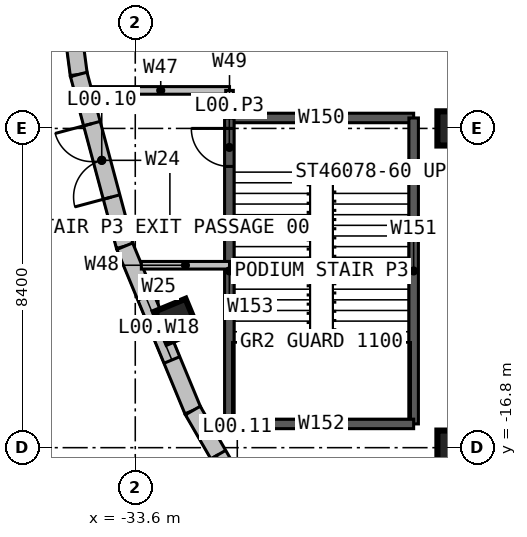
"""IFC4 building model, lengths in metres.
Left out: names, types, materials, properties, quantities, classifications, styles, units other than length and angle.
Written with IfcOpenShell. Run it as: python <this file> out.ifc"""

import sys

from ifc_helpers import new_model, si_unit, direction, frame, frame_2d, origin, origin_2d, place, context, subcontext, project, spatial, rectangle, extrude, element, fill, save


model = new_model("IFC4")
c1 = context("Model", 3, precision=1e-05, world=origin(), true_north=direction((0.0, 1.0)))
c2 = subcontext(c1, "Body", "Model", "MODEL_VIEW")
j1 = project(units=[si_unit("LENGTHUNIT", "METRE"), si_unit("PLANEANGLEUNIT", "RADIAN")], contexts=[c1])
p1 = place(None, origin())
s1 = spatial("IfcSite", under=j1, at=p1, CompositionType="ELEMENT")
p2 = place(p1, origin())
s2 = spatial("IfcBuilding", under=s1, at=p2, CompositionType="ELEMENT")
p3 = place(p2, origin())
s3 = spatial("IfcBuildingStorey", under=s2, at=p3, CompositionType="ELEMENT", Elevation=0.0)
for number, where, z_axis, x_axis in (
    (1, (-25.2, -16.8, 0.0), (0.0, 0.0, 1.0), (1.0, 0.0, 0.0)),
    (2, (-25.2, -8.4, 0.0), (0.0, 0.0, 1.0), (1.0, 0.0, 0.0)),
    (3, (-32.521, -13.47, 0.0), (0.0, 0.0, 1.0), (-0.924, -0.383, 0.0)),
):
    element("IfcColumn", number, at=place(p3, frame(where, z_axis=z_axis, x_axis=x_axis)), inside=s3, PredefinedType="COLUMN", context=c2, shape_type="SweptSolid", body=[
        extrude(rectangle(XDim=0.9, YDim=0.9, at=origin_2d()), origin(), (0.0, 0.0, 1.0), 6.0),
    ])
p4 = place(p3, frame((-35.698, -2.34, 0.0), z_axis=(0.0, 0.0, 1.0), x_axis=(0.130536838198, -0.991443459746, 0.0)))
e4 = element("IfcWall", 4, at=p4, inside=s3, PredefinedType="SOLIDWALL", context=c2, shape_type="SweptSolid", body=[
    extrude(rectangle(XDim=4.679, YDim=0.45, at=frame_2d((2.34, 0.0))), origin(), (0.0, 0.0, 1.0), 5.7),
])
p5 = place(p4, frame((1.44, 0.0, 0.9)))
e5 = element("IfcOpeningElement", 5, at=p5, cuts=e4, PredefinedType="OPENING", context=c2, shape_type="SweptSolid", body=[
    extrude(rectangle(XDim=1.8, YDim=3.6, at=frame_2d((0.9, 1.8))), frame((0.0, 0.235, 0.0), z_axis=(0.0, -1.0, 0.0), x_axis=(1.0, 0.0, 0.0)), (0.0, 0.0, 1.0), 0.47),
])
p6 = place(p3, frame((-35.088, -6.979, 0.0), z_axis=(0.0, 0.0, 1.0), x_axis=(0.258815185258, -0.965926860523, 0.0)))
e6 = element("IfcWall", 6, at=p6, inside=s3, PredefinedType="SOLIDWALL", context=c2, shape_type="SweptSolid", body=[
    extrude(rectangle(XDim=4.68, YDim=0.45, at=frame_2d((2.34, 0.0))), origin(), (0.0, 0.0, 1.0), 5.7),
])
p7 = place(p6, frame((1.34, 0.0, 0.0)))
e7 = element("IfcOpeningElement", 7, at=p7, cuts=e6, PredefinedType="OPENING", context=c2, shape_type="SweptSolid", body=[
    extrude(rectangle(XDim=2.0, YDim=3.0, at=frame_2d((1.0, 1.5))), frame((0.0, 0.235, 0.0), z_axis=(0.0, -1.0, 0.0), x_axis=(1.0, 0.0, 0.0)), (0.0, 0.0, 1.0), 0.47),
])
p8 = place(p3, frame((-33.876, -11.5, 0.0), z_axis=(0.0, 0.0, 1.0), x_axis=(0.382669718086, -0.923885213032, 0.0)))
e8 = element("IfcWall", 8, at=p8, inside=s3, PredefinedType="SOLIDWALL", context=c2, shape_type="SweptSolid", body=[
    extrude(rectangle(XDim=4.68, YDim=0.45, at=frame_2d((2.34, 0.0))), origin(), (0.0, 0.0, 1.0), 5.7),
])
p9 = place(p8, frame((1.44, 0.0, 0.9)))
e9 = element("IfcOpeningElement", 9, at=p9, cuts=e8, PredefinedType="OPENING", context=c2, shape_type="SweptSolid", body=[
    extrude(rectangle(XDim=1.8, YDim=3.6, at=frame_2d((0.9, 1.8))), frame((0.0, 0.235, 0.0), z_axis=(0.0, -1.0, 0.0), x_axis=(1.0, 0.0, 0.0)), (0.0, 0.0, 1.0), 0.47),
])
p10 = place(p3, frame((-32.086, -15.823, 0.0), z_axis=(0.0, 0.0, 1.0), x_axis=(0.500022025083, -0.866012687223, 0.0)))
e10 = element("IfcWall", 10, at=p10, inside=s3, PredefinedType="SOLIDWALL", context=c2, shape_type="SweptSolid", body=[
    extrude(rectangle(XDim=4.679, YDim=0.45, at=frame_2d((2.34, 0.0))), origin(), (0.0, 0.0, 1.0), 5.7),
])
p11 = place(p10, frame((1.34, 0.0, 0.0)))
e11 = element("IfcOpeningElement", 11, at=p11, cuts=e10, PredefinedType="OPENING", context=c2, shape_type="SweptSolid", body=[
    extrude(rectangle(XDim=2.0, YDim=3.0, at=frame_2d((1.0, 1.5))), frame((0.0, 0.235, 0.0), z_axis=(0.0, -1.0, 0.0), x_axis=(1.0, 0.0, 0.0)), (0.0, 0.0, 1.0), 0.47),
])
p12 = place(p3, frame((-31.125, -8.125, 0.0), z_axis=(0.0, 0.0, 1.0), x_axis=(1.0, 0.0, 0.0)))
e12 = element("IfcWall", 12, at=p12, inside=s3, PredefinedType="SOLIDWALL", context=c2, shape_type="SweptSolid", body=[
    extrude(rectangle(XDim=4.85, YDim=0.25, at=frame_2d((2.425, 0.0))), origin(), (0.0, 0.0, 1.0), 6.0),
])
p13 = place(p3, frame((-26.275, -8.125, 0.0), z_axis=(0.0, 0.0, 1.0), x_axis=(0.0, -1.0, 0.0)))
e13 = element("IfcWall", 13, at=p13, inside=s3, PredefinedType="SOLIDWALL", context=c2, shape_type="SweptSolid", body=[
    extrude(rectangle(XDim=8.05, YDim=0.25, at=frame_2d((4.025, 0.0))), origin(), (0.0, 0.0, 1.0), 6.0),
])
p14 = place(p3, frame((-26.275, -16.175, 0.0), z_axis=(0.0, 0.0, 1.0), x_axis=(-1.0, 0.0, 0.0)))
e14 = element("IfcWall", 14, at=p14, inside=s3, PredefinedType="SOLIDWALL", context=c2, shape_type="SweptSolid", body=[
    extrude(rectangle(XDim=4.85, YDim=0.25, at=frame_2d((2.425, 0.0))), origin(), (0.0, 0.0, 1.0), 6.0),
])
p15 = place(p3, frame((-31.125, -16.175, 0.0), z_axis=(0.0, 0.0, 1.0), x_axis=(0.0, 1.0, 0.0)))
e15 = element("IfcWall", 15, at=p15, inside=s3, PredefinedType="SOLIDWALL", context=c2, shape_type="SweptSolid", body=[
    extrude(rectangle(XDim=8.05, YDim=0.25, at=frame_2d((4.025, 0.0))), origin(), (0.0, 0.0, 1.0), 6.0),
])
p16 = place(p15, frame((6.775, 0.0, 0.0)))
e16 = element("IfcOpeningElement", 16, at=p16, cuts=e15, PredefinedType="OPENING", context=c2, shape_type="SweptSolid", body=[
    extrude(rectangle(XDim=1.0, YDim=2.2, at=frame_2d((0.5, 1.1))), frame((0.0, 0.135, 0.0), z_axis=(0.0, -1.0, 0.0), x_axis=(1.0, 0.0, 0.0)), (0.0, 0.0, 1.0), 0.27),
])
p17 = place(p3, frame((-34.74, -7.4, 0.0), z_axis=(0.0, 0.0, 1.0), x_axis=(1.0, 0.0, 0.0)))
e17 = element("IfcWall", 17, at=p17, inside=s3, PredefinedType="PARTITIONING", context=c2, shape_type="SweptSolid", body=[
    extrude(rectangle(XDim=3.62, YDim=0.2, at=frame_2d((1.81, 0.0))), origin(), (0.0, 0.0, 1.0), 5.7),
])
p18 = place(p3, frame((-33.44, -12.0, 0.0), z_axis=(0.0, 0.0, 1.0), x_axis=(1.0, 0.0, 0.0)))
e18 = element("IfcWall", 18, at=p18, inside=s3, PredefinedType="PARTITIONING", context=c2, shape_type="SweptSolid", body=[
    extrude(rectangle(XDim=2.32, YDim=0.2, at=frame_2d((1.16, 0.0))), origin(), (0.0, 0.0, 1.0), 5.7),
])
p19 = place(p3, frame((-31.12, -8.12, 0.0), z_axis=(0.0, 0.0, 1.0), x_axis=(0.0, 1.0, 0.0)))
e19 = element("IfcWall", 19, at=p19, inside=s3, PredefinedType="PARTITIONING", context=c2, shape_type="SweptSolid", body=[
    extrude(rectangle(XDim=0.72, YDim=0.2, at=frame_2d((0.36, 0.0))), origin(), (0.0, 0.0, 1.0), 5.7),
])
p20 = place(p7, frame((2.0, 0.0, 0.0), z_axis=(0.0, 0.0, 1.0), x_axis=(-1.0, 0.0, 0.0)))
e20 = element("IfcDoor", 20, at=p20, inside=s3, OperationType="DOUBLE_DOOR_SINGLE_SWING", PredefinedType="DOOR", context=c2, shape_type="SweptSolid", body=[
    extrude(rectangle(XDim=2.0, YDim=3.0, at=frame_2d((1.0, 1.5))), frame((0.0, 0.025, 0.0), z_axis=(0.0, -1.0, 0.0), x_axis=(1.0, 0.0, 0.0)), (0.0, 0.0, 1.0), 0.05),
])
fill(e7, e20)
p21 = place(p9, origin())
e21 = element("IfcWindow", 21, at=p21, inside=s3, PartitioningType="SINGLE_PANEL", PredefinedType="WINDOW", context=c2, shape_type="SweptSolid", body=[
    extrude(rectangle(XDim=1.8, YDim=3.6, at=frame_2d((0.9, 1.8))), frame((0.0, 0.03, 0.0), z_axis=(0.0, -1.0, 0.0), x_axis=(1.0, 0.0, 0.0)), (0.0, 0.0, 1.0), 0.06),
])
fill(e9, e21)
p22 = place(p11, frame((2.0, 0.0, 0.0), z_axis=(0.0, 0.0, 1.0), x_axis=(-1.0, 0.0, 0.0)))
e22 = element("IfcDoor", 22, at=p22, inside=s3, OperationType="DOUBLE_DOOR_SINGLE_SWING", PredefinedType="DOOR", context=c2, shape_type="SweptSolid", body=[
    extrude(rectangle(XDim=2.0, YDim=3.0, at=frame_2d((1.0, 1.5))), frame((0.0, 0.025, 0.0), z_axis=(0.0, -1.0, 0.0), x_axis=(1.0, 0.0, 0.0)), (0.0, 0.0, 1.0), 0.05),
])
fill(e11, e22)
p23 = place(p16, origin())
e23 = element("IfcDoor", 23, at=p23, inside=s3, OperationType="SINGLE_SWING_RIGHT", PredefinedType="DOOR", context=c2, shape_type="SweptSolid", body=[
    extrude(rectangle(XDim=1.0, YDim=2.2, at=frame_2d((0.5, 1.1))), frame((0.0, 0.025, 0.0), z_axis=(0.0, -1.0, 0.0), x_axis=(1.0, 0.0, 0.0)), (0.0, 0.0, 1.0), 0.05),
])
fill(e16, e23)
save(model, sys.argv[1])
